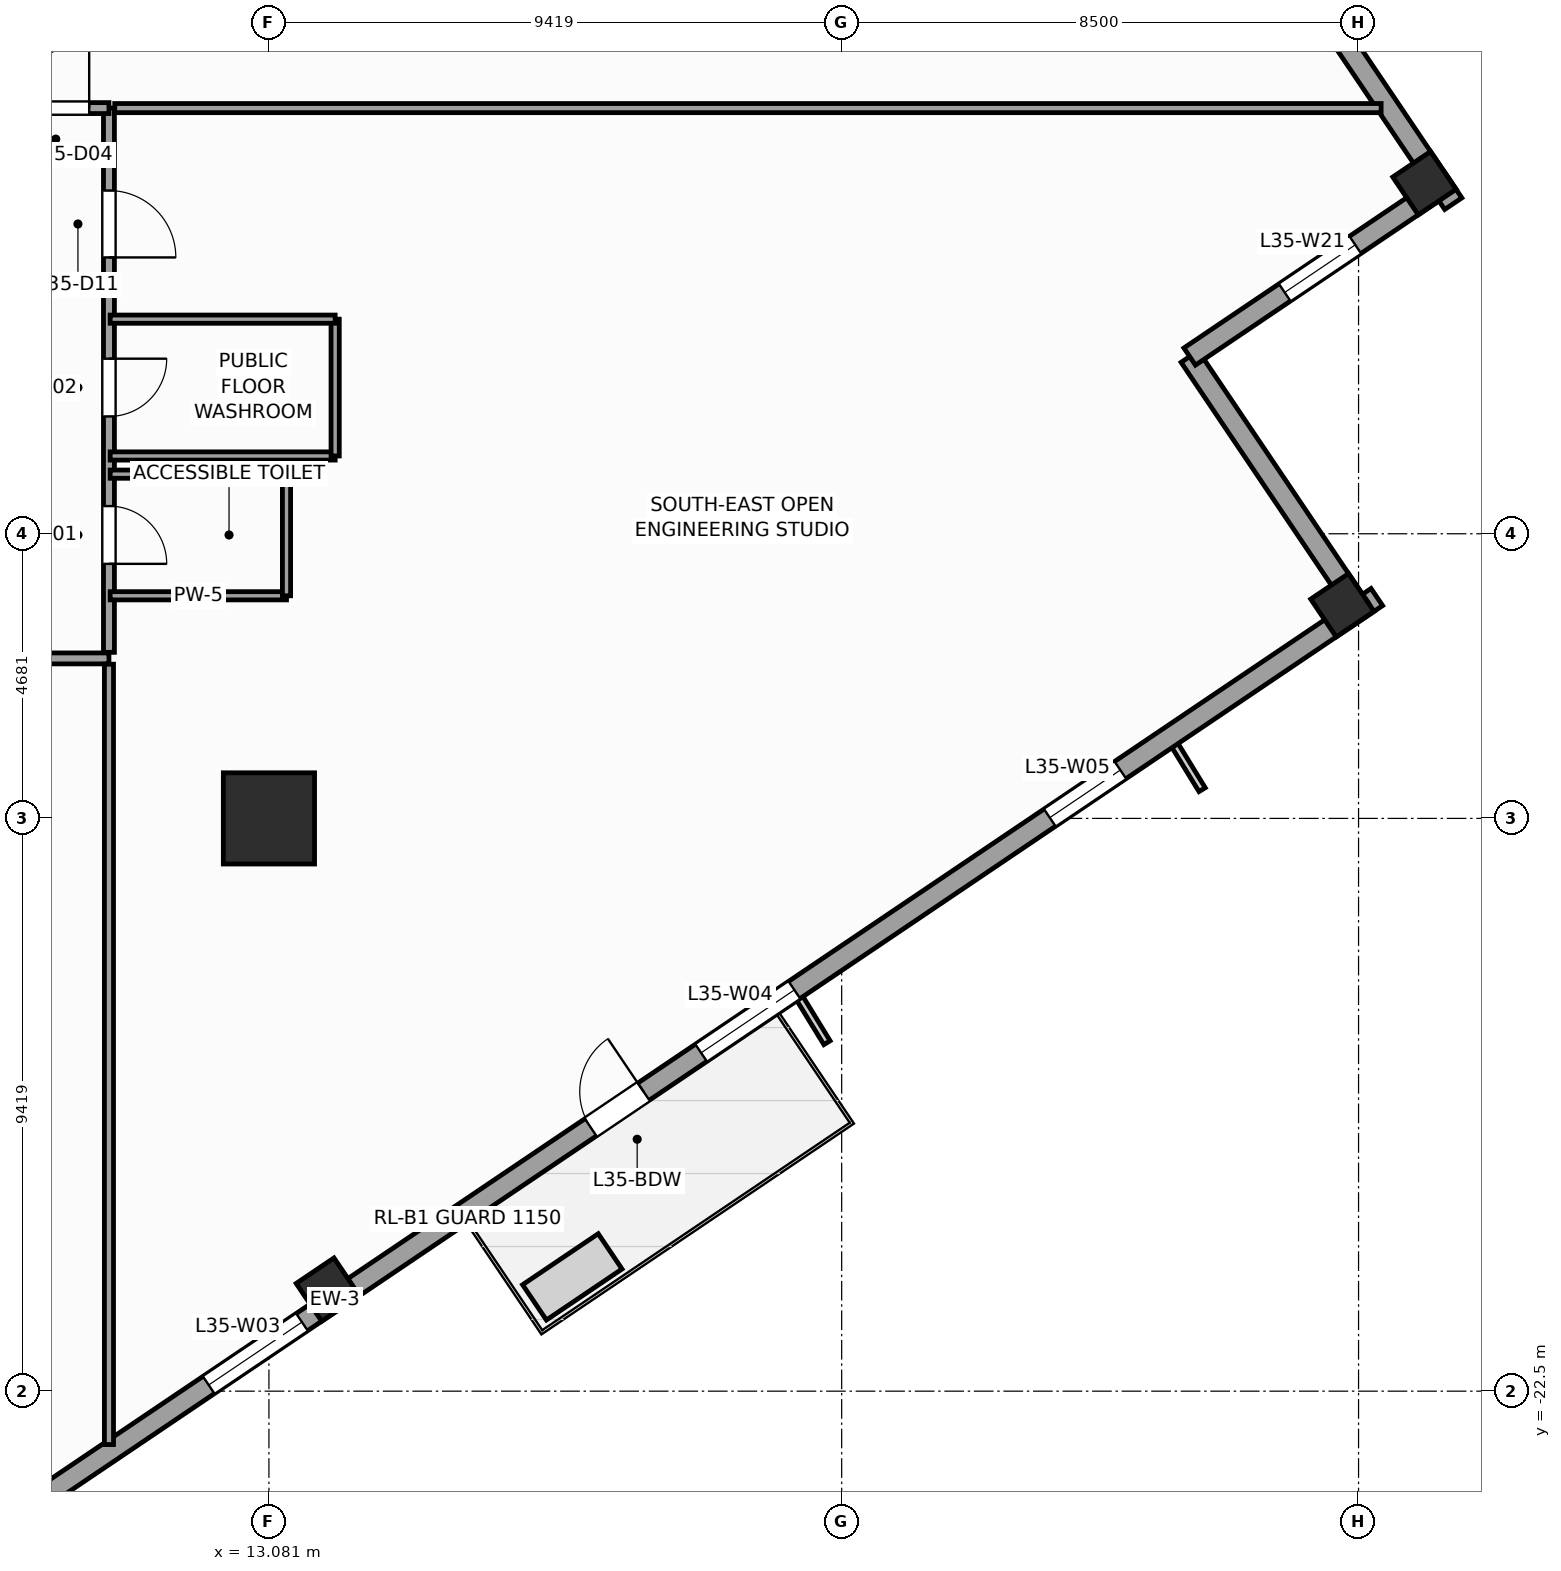
"""IFC4 building model, lengths in metres.
Left out: names, types, materials, properties, quantities, classifications, styles, units other than length and angle.
Written with IfcOpenShell. Run it as: python <this file> out.ifc"""

import sys

from ifc_helpers import new_model, si_unit, direction, frame, frame_2d, origin, origin_2d, place, context, subcontext, project, spatial, rectangle, extrude, source, transform, mapped, element, fill, save


model = new_model("IFC4")
c1 = context("Model", 3, precision=1e-05, world=origin(), true_north=direction((0.0, 1.0)))
c2 = subcontext(c1, "Body", "Model", "MODEL_VIEW")
j1 = project(units=[si_unit("LENGTHUNIT", "METRE"), si_unit("PLANEANGLEUNIT", "RADIAN")], contexts=[c1])
p1 = place(None, origin())
s1 = spatial("IfcSite", under=j1, at=p1, CompositionType="ELEMENT")
p2 = place(p1, origin())
s2 = spatial("IfcBuilding", under=s1, at=p2, CompositionType="ELEMENT")
p3 = place(p2, frame((0.0, 0.0, 148.4)))
s3 = spatial("IfcBuildingStorey", under=s2, at=p3, CompositionType="ELEMENT", Elevation=148.4)
m1 = source(origin(), c2, "Body", "SweptSolid", [
    extrude(rectangle(XDim=1.5, YDim=1.5, at=origin_2d()), origin(), (0.0, 0.0, 1.0), 4.0),
])
p4 = place(p3, frame((13.081, -13.081, 0.0), z_axis=(0.0, 0.0, 1.0), x_axis=(1.0, 0.0, 0.0)))
e1 = element("IfcColumn", 1, at=p4, inside=s3, PredefinedType="COLUMN", context=c2, shape_type="MappedRepresentation", body=[
    mapped(m1, transform((0.0, 0.0, 0.0), scale=1.0)),
])
m2 = source(origin(), c2, "Body", "SweptSolid", [
    extrude(rectangle(XDim=0.75, YDim=0.75, at=origin_2d()), origin(), (0.0, 0.0, 1.0), 4.0),
])
for number, where, z_axis, x_axis in (
    (2, (14.05, -20.83, 0.0), (0.0, 0.0, 1.0), (0.829, 0.559, 0.0)),
    (3, (30.734, -9.576, 0.0), (0.0, 0.0, 1.0), (0.829, 0.559, 0.0)),
    (4, (32.083, -2.635, 0.0), (0.0, 0.0, 1.0), (0.829, 0.559, 0.0)),
):
    element("IfcColumn", number, at=place(p3, frame(where, z_axis=z_axis, x_axis=x_axis)), inside=s3, PredefinedType="COLUMN", context=c2, shape_type="MappedRepresentation", body=[
        mapped(m2, transform((0.0, 0.0, 0.0), scale=1.0)),
    ])
p5 = place(p3, frame((-2.972, -32.558, 0.0), z_axis=(0.0, 0.0, 1.0), x_axis=(0.829036218961, 0.559194910251, 0.0)))
e5 = element("IfcWall", 5, at=p5, inside=s3, PredefinedType="STANDARD", context=c2, shape_type="SweptSolid", body=[
    extrude(rectangle(XDim=41.34, YDim=0.34, at=frame_2d((20.67, 0.0))), origin(), (0.0, 0.0, 1.0), 3.04),
])
p6 = place(p5, frame((25.745, 0.0, 0.0)))
e6 = element("IfcOpeningElement", 6, at=p6, cuts=e5, PredefinedType="OPENING", context=c2, shape_type="SweptSolid", body=[
    extrude(rectangle(XDim=1.05, YDim=2.25, at=frame_2d((0.525, 1.125))), frame((0.0, 0.18, 0.0), z_axis=(0.0, -1.0, 0.0), x_axis=(1.0, 0.0, 0.0)), (0.0, 0.0, 1.0), 0.36),
])
p7 = place(p5, frame((4.261, 0.0, 0.56)))
e7 = element("IfcOpeningElement", 7, at=p7, cuts=e5, PredefinedType="OPENING", context=c2, shape_type="SweptSolid", body=[
    extrude(rectangle(XDim=1.4, YDim=2.4, at=frame_2d((0.7, 1.2))), frame((0.0, 0.18, 0.0), z_axis=(0.0, -1.0, 0.0), x_axis=(1.0, 0.0, 0.0)), (0.0, 0.0, 1.0), 0.36),
])
p8 = place(p5, frame((11.064, 0.0, 0.61)))
e8 = element("IfcOpeningElement", 8, at=p8, cuts=e5, PredefinedType="OPENING", context=c2, shape_type="SweptSolid", body=[
    extrude(rectangle(XDim=1.85, YDim=2.35, at=frame_2d((0.925, 1.175))), frame((0.0, 0.18, 0.0), z_axis=(0.0, -1.0, 0.0), x_axis=(1.0, 0.0, 0.0)), (0.0, 0.0, 1.0), 0.36),
])
p9 = place(p5, frame((18.168, 0.0, 0.61)))
e9 = element("IfcOpeningElement", 9, at=p9, cuts=e5, PredefinedType="OPENING", context=c2, shape_type="SweptSolid", body=[
    extrude(rectangle(XDim=1.85, YDim=2.35, at=frame_2d((0.925, 1.175))), frame((0.0, 0.18, 0.0), z_axis=(0.0, -1.0, 0.0), x_axis=(1.0, 0.0, 0.0)), (0.0, 0.0, 1.0), 0.36),
])
p10 = place(p5, frame((27.936, 0.0, 0.61)))
e10 = element("IfcOpeningElement", 10, at=p10, cuts=e5, PredefinedType="OPENING", context=c2, shape_type="SweptSolid", body=[
    extrude(rectangle(XDim=1.85, YDim=2.35, at=frame_2d((0.925, 1.175))), frame((0.0, 0.18, 0.0), z_axis=(0.0, -1.0, 0.0), x_axis=(1.0, 0.0, 0.0)), (0.0, 0.0, 1.0), 0.36),
])
p11 = place(p5, frame((34.852, 0.0, 0.56)))
e11 = element("IfcOpeningElement", 11, at=p11, cuts=e5, PredefinedType="OPENING", context=c2, shape_type="SweptSolid", body=[
    extrude(rectangle(XDim=1.4, YDim=2.4, at=frame_2d((0.7, 1.2))), frame((0.0, 0.18, 0.0), z_axis=(0.0, -1.0, 0.0), x_axis=(1.0, 0.0, 0.0)), (0.0, 0.0, 1.0), 0.36),
])
p12 = place(p3, frame((31.019, -9.631, 0.0), z_axis=(0.0, 0.0, 1.0), x_axis=(-0.559210350234, 0.829025804298, 0.0)))
e12 = element("IfcWall", 12, at=p12, inside=s3, PredefinedType="STANDARD", context=c2, shape_type="SweptSolid", body=[
    extrude(rectangle(XDim=5.0, YDim=0.34, at=frame_2d((2.5, 0.0))), origin(), (0.0, 0.0, 1.0), 3.74),
])
p13 = place(p3, frame((28.223, -5.486, 0.0), z_axis=(0.0, 0.0, 1.0), x_axis=(0.82905227345, 0.559171107879, 0.0)))
e13 = element("IfcWall", 13, at=p13, inside=s3, PredefinedType="STANDARD", context=c2, shape_type="SweptSolid", body=[
    extrude(rectangle(XDim=5.17, YDim=0.34, at=frame_2d((2.585, 0.0))), origin(), (0.0, 0.0, 1.0), 3.04),
])
p14 = place(p13, frame((1.885, 0.0, 0.56)))
e14 = element("IfcOpeningElement", 14, at=p14, cuts=e13, PredefinedType="OPENING", context=c2, shape_type="SweptSolid", body=[
    extrude(rectangle(XDim=1.4, YDim=2.4, at=frame_2d((0.7, 1.2))), frame((0.0, 0.18, 0.0), z_axis=(0.0, -1.0, 0.0), x_axis=(1.0, 0.0, 0.0)), (0.0, 0.0, 1.0), 0.36),
])
p15 = place(p3, frame((32.558, -2.972, 0.0), z_axis=(0.0, 0.0, 1.0), x_axis=(-0.559194910251, 0.829036218961, 0.0)))
e15 = element("IfcWall", 15, at=p15, inside=s3, PredefinedType="STANDARD", context=c2, shape_type="SweptSolid", body=[
    extrude(rectangle(XDim=41.34, YDim=0.34, at=frame_2d((20.67, 0.0))), origin(), (0.0, 0.0, 1.0), 3.04),
])
p16 = place(p15, frame((4.261, 0.0, 0.56)))
e16 = element("IfcOpeningElement", 16, at=p16, cuts=e15, PredefinedType="OPENING", context=c2, shape_type="SweptSolid", body=[
    extrude(rectangle(XDim=1.4, YDim=2.4, at=frame_2d((0.7, 1.2))), frame((0.0, 0.18, 0.0), z_axis=(0.0, -1.0, 0.0), x_axis=(1.0, 0.0, 0.0)), (0.0, 0.0, 1.0), 0.36),
])
p17 = place(p15, frame((11.064, 0.0, 0.61)))
e17 = element("IfcOpeningElement", 17, at=p17, cuts=e15, PredefinedType="OPENING", context=c2, shape_type="SweptSolid", body=[
    extrude(rectangle(XDim=1.85, YDim=2.35, at=frame_2d((0.925, 1.175))), frame((0.0, 0.18, 0.0), z_axis=(0.0, -1.0, 0.0), x_axis=(1.0, 0.0, 0.0)), (0.0, 0.0, 1.0), 0.36),
])
p18 = place(p15, frame((18.168, 0.0, 0.61)))
e18 = element("IfcOpeningElement", 18, at=p18, cuts=e15, PredefinedType="OPENING", context=c2, shape_type="SweptSolid", body=[
    extrude(rectangle(XDim=1.85, YDim=2.35, at=frame_2d((0.925, 1.175))), frame((0.0, 0.18, 0.0), z_axis=(0.0, -1.0, 0.0), x_axis=(1.0, 0.0, 0.0)), (0.0, 0.0, 1.0), 0.36),
])
p19 = place(p15, frame((27.186, 0.0, 0.61)))
e19 = element("IfcOpeningElement", 19, at=p19, cuts=e15, PredefinedType="OPENING", context=c2, shape_type="SweptSolid", body=[
    extrude(rectangle(XDim=1.85, YDim=2.35, at=frame_2d((0.925, 1.175))), frame((0.0, 0.18, 0.0), z_axis=(0.0, -1.0, 0.0), x_axis=(1.0, 0.0, 0.0)), (0.0, 0.0, 1.0), 0.36),
])
p20 = place(p15, frame((34.852, 0.0, 0.56)))
e20 = element("IfcOpeningElement", 20, at=p20, cuts=e15, PredefinedType="OPENING", context=c2, shape_type="SweptSolid", body=[
    extrude(rectangle(XDim=1.4, YDim=2.4, at=frame_2d((0.7, 1.2))), frame((0.0, 0.18, 0.0), z_axis=(0.0, -1.0, 0.0), x_axis=(1.0, 0.0, 0.0)), (0.0, 0.0, 1.0), 0.36),
])
p21 = place(p3, frame((-10.45, -10.45, 0.0), z_axis=(0.0, 0.0, 1.0), x_axis=(1.0, 0.0, 0.0)))
e21 = element("IfcWall", 21, at=p21, inside=s3, PredefinedType="PARTITIONING", context=c2, shape_type="SweptSolid", body=[
    extrude(rectangle(XDim=20.9, YDim=0.18, at=frame_2d((10.45, 0.0))), origin(), (0.0, 0.0, 1.0), 3.74),
])
p22 = place(p21, frame((2.339, 0.0, 0.0)))
e22 = element("IfcOpeningElement", 22, at=p22, cuts=e21, PredefinedType="OPENING", context=c2, shape_type="SweptSolid", body=[
    extrude(rectangle(XDim=1.1, YDim=2.2, at=frame_2d((0.55, 1.1))), frame((0.0, 0.1, 0.0), z_axis=(0.0, -1.0, 0.0), x_axis=(1.0, 0.0, 0.0)), (0.0, 0.0, 1.0), 0.2),
])
p23 = place(p21, frame((7.4, 0.0, 0.0)))
e23 = element("IfcOpeningElement", 23, at=p23, cuts=e21, PredefinedType="OPENING", context=c2, shape_type="SweptSolid", body=[
    extrude(rectangle(XDim=1.1, YDim=2.2, at=frame_2d((0.55, 1.1))), frame((0.0, 0.1, 0.0), z_axis=(0.0, -1.0, 0.0), x_axis=(1.0, 0.0, 0.0)), (0.0, 0.0, 1.0), 0.2),
])
p24 = place(p21, frame((12.4, 0.0, 0.0)))
e24 = element("IfcOpeningElement", 24, at=p24, cuts=e21, PredefinedType="OPENING", context=c2, shape_type="SweptSolid", body=[
    extrude(rectangle(XDim=1.1, YDim=2.2, at=frame_2d((0.55, 1.1))), frame((0.0, 0.1, 0.0), z_axis=(0.0, -1.0, 0.0), x_axis=(1.0, 0.0, 0.0)), (0.0, 0.0, 1.0), 0.2),
])
p25 = place(p21, frame((17.46, 0.0, 0.0)))
e25 = element("IfcOpeningElement", 25, at=p25, cuts=e21, PredefinedType="OPENING", context=c2, shape_type="SweptSolid", body=[
    extrude(rectangle(XDim=1.1, YDim=2.2, at=frame_2d((0.55, 1.1))), frame((0.0, 0.1, 0.0), z_axis=(0.0, -1.0, 0.0), x_axis=(1.0, 0.0, 0.0)), (0.0, 0.0, 1.0), 0.2),
])
p26 = place(p3, frame((10.45, -10.35, 0.0), z_axis=(0.0, 0.0, 1.0), x_axis=(0.0, 1.0, 0.0)))
e26 = element("IfcWall", 26, at=p26, inside=s3, PredefinedType="PARTITIONING", context=c2, shape_type="SweptSolid", body=[
    extrude(rectangle(XDim=8.95, YDim=0.18, at=frame_2d((4.475, 0.0))), origin(), (0.0, 0.0, 1.0), 3.74),
])
p27 = place(p26, frame((1.455, 0.0, 0.0)))
e27 = element("IfcOpeningElement", 27, at=p27, cuts=e26, PredefinedType="OPENING", context=c2, shape_type="SweptSolid", body=[
    extrude(rectangle(XDim=0.95, YDim=2.1, at=frame_2d((0.475, 1.05))), frame((0.0, 0.1, 0.0), z_axis=(0.0, -1.0, 0.0), x_axis=(1.0, 0.0, 0.0)), (0.0, 0.0, 1.0), 0.2),
])
p28 = place(p26, frame((3.879, 0.0, 0.0)))
e28 = element("IfcOpeningElement", 28, at=p28, cuts=e26, PredefinedType="OPENING", context=c2, shape_type="SweptSolid", body=[
    extrude(rectangle(XDim=0.95, YDim=2.1, at=frame_2d((0.475, 1.05))), frame((0.0, 0.1, 0.0), z_axis=(0.0, -1.0, 0.0), x_axis=(1.0, 0.0, 0.0)), (0.0, 0.0, 1.0), 0.2),
])
p29 = place(p26, frame((6.494, 0.0, 0.0)))
e29 = element("IfcOpeningElement", 29, at=p29, cuts=e26, PredefinedType="OPENING", context=c2, shape_type="SweptSolid", body=[
    extrude(rectangle(XDim=1.1, YDim=2.2, at=frame_2d((0.55, 1.1))), frame((0.0, 0.1, 0.0), z_axis=(0.0, -1.0, 0.0), x_axis=(1.0, 0.0, 0.0)), (0.0, 0.0, 1.0), 0.2),
])
p30 = place(p3, frame((8.7, -1.4, 0.0), z_axis=(0.0, 0.0, 1.0), x_axis=(1.0, 0.0, 0.0)))
e30 = element("IfcWall", 30, at=p30, inside=s3, PredefinedType="PARTITIONING", context=c2, shape_type="SweptSolid", body=[
    extrude(rectangle(XDim=1.75, YDim=0.18, at=frame_2d((0.875, 0.0))), origin(), (0.0, 0.0, 1.0), 3.74),
])
p31 = place(p30, frame((0.325, 0.0, 0.0)))
e31 = element("IfcOpeningElement", 31, at=p31, cuts=e30, PredefinedType="OPENING", context=c2, shape_type="SweptSolid", body=[
    extrude(rectangle(XDim=1.1, YDim=2.2, at=frame_2d((0.55, 1.1))), frame((0.0, 0.1, 0.0), z_axis=(0.0, -1.0, 0.0), x_axis=(1.0, 0.0, 0.0)), (0.0, 0.0, 1.0), 0.2),
])
p32 = place(p3, frame((10.545, -1.4, 0.0), z_axis=(0.0, 0.0, 1.0), x_axis=(1.0, 0.0, 0.0)))
e32 = element("IfcWall", 32, at=p32, inside=s3, PredefinedType="PARTITIONING", context=c2, shape_type="SweptSolid", body=[
    extrude(rectangle(XDim=20.826, YDim=0.15, at=frame_2d((10.413, 0.0))), origin(), (0.0, 0.0, 1.0), 3.74),
])
p33 = place(p3, frame((10.45, -23.378, 0.0), z_axis=(0.0, 0.0, 1.0), x_axis=(0.0, 1.0, 0.0)))
e33 = element("IfcWall", 33, at=p33, inside=s3, PredefinedType="PARTITIONING", context=c2, shape_type="SweptSolid", body=[
    extrude(rectangle(XDim=12.833, YDim=0.15, at=frame_2d((6.417, 0.0))), origin(), (0.0, 0.0, 1.0), 3.74),
])
p34 = place(p3, frame((10.47, -9.42, 0.0), z_axis=(0.0, 0.0, 1.0), x_axis=(1.0, 0.0, 0.0)))
e34 = element("IfcWall", 34, at=p34, inside=s3, PredefinedType="PARTITIONING", context=c2, shape_type="SweptSolid", body=[
    extrude(rectangle(XDim=2.9, YDim=0.135, at=frame_2d((1.45, 0.0))), origin(), (0.0, 0.0, 1.0), 3.74),
])
p35 = place(p3, frame((13.37, -9.42, 0.0), z_axis=(0.0, 0.0, 1.0), x_axis=(0.0, 1.0, 0.0)))
e35 = element("IfcWall", 35, at=p35, inside=s3, PredefinedType="PARTITIONING", context=c2, shape_type="SweptSolid", body=[
    extrude(rectangle(XDim=2.0, YDim=0.135, at=frame_2d((1.0, 0.0))), origin(), (0.0, 0.0, 1.0), 2.84),
])
p36 = place(p3, frame((10.47, -7.42, 0.0), z_axis=(0.0, 0.0, 1.0), x_axis=(1.0, 0.0, 0.0)))
e36 = element("IfcWall", 36, at=p36, inside=s3, PredefinedType="PARTITIONING", context=c2, shape_type="SweptSolid", body=[
    extrude(rectangle(XDim=2.9, YDim=0.135, at=frame_2d((1.45, 0.0))), origin(), (0.0, 0.0, 1.0), 3.74),
])
p37 = place(p3, frame((10.47, -7.121, 0.0), z_axis=(0.0, 0.0, 1.0), x_axis=(1.0, 0.0, 0.0)))
e37 = element("IfcWall", 37, at=p37, inside=s3, PredefinedType="PARTITIONING", context=c2, shape_type="SweptSolid", body=[
    extrude(rectangle(XDim=3.7, YDim=0.135, at=frame_2d((1.85, 0.0))), origin(), (0.0, 0.0, 1.0), 3.74),
])
p38 = place(p3, frame((14.17, -7.121, 0.0), z_axis=(0.0, 0.0, 1.0), x_axis=(0.0, 1.0, 0.0)))
e38 = element("IfcWall", 38, at=p38, inside=s3, PredefinedType="PARTITIONING", context=c2, shape_type="SweptSolid", body=[
    extrude(rectangle(XDim=2.25, YDim=0.135, at=frame_2d((1.125, 0.0))), origin(), (0.0, 0.0, 1.0), 3.74),
])
p39 = place(p3, frame((10.47, -4.871, 0.0), z_axis=(0.0, 0.0, 1.0), x_axis=(1.0, 0.0, 0.0)))
e39 = element("IfcWall", 39, at=p39, inside=s3, PredefinedType="PARTITIONING", context=c2, shape_type="SweptSolid", body=[
    extrude(rectangle(XDim=3.7, YDim=0.135, at=frame_2d((1.85, 0.0))), origin(), (0.0, 0.0, 1.0), 3.74),
])
m3 = source(origin(), c2, "Body", "SweptSolid", [
    extrude(rectangle(XDim=1.05, YDim=2.25, at=frame_2d((0.525, 1.125))), frame((0.0, 0.025, 0.0), z_axis=(0.0, -1.0, 0.0), x_axis=(1.0, 0.0, 0.0)), (0.0, 0.0, 1.0), 0.05),
])
p40 = place(p6, origin())
e40 = element("IfcDoor", 40, at=p40, inside=s3, OperationType="SINGLE_SWING_RIGHT", PredefinedType="DOOR", context=c2, shape_type="MappedRepresentation", body=[
    mapped(m3, transform((0.0, 0.0, 0.0), scale=1.0)),
])
fill(e6, e40)
m4 = source(origin(), c2, "Body", "SweptSolid", [
    extrude(rectangle(XDim=1.85, YDim=2.35, at=frame_2d((0.925, 1.175))), frame((0.0, 0.03, 0.0), z_axis=(0.0, -1.0, 0.0), x_axis=(1.0, 0.0, 0.0)), (0.0, 0.0, 1.0), 0.06),
])
p41 = place(p9, origin())
e41 = element("IfcWindow", 41, at=p41, inside=s3, PartitioningType="SINGLE_PANEL", PredefinedType="WINDOW", context=c2, shape_type="MappedRepresentation", body=[
    mapped(m4, transform((0.0, 0.0, 0.0), scale=1.0)),
])
fill(e9, e41)
p42 = place(p10, origin())
e42 = element("IfcWindow", 42, at=p42, inside=s3, PartitioningType="SINGLE_PANEL", PredefinedType="WINDOW", context=c2, shape_type="MappedRepresentation", body=[
    mapped(m4, transform((0.0, 0.0, 0.0), scale=1.0)),
])
fill(e10, e42)
m5 = source(origin(), c2, "Body", "SweptSolid", [
    extrude(rectangle(XDim=1.4, YDim=2.4, at=frame_2d((0.7, 1.2))), frame((0.0, 0.03, 0.0), z_axis=(0.0, -1.0, 0.0), x_axis=(1.0, 0.0, 0.0)), (0.0, 0.0, 1.0), 0.06),
])
p43 = place(p11, origin())
e43 = element("IfcWindow", 43, at=p43, inside=s3, PartitioningType="SINGLE_PANEL", PredefinedType="WINDOW", context=c2, shape_type="MappedRepresentation", body=[
    mapped(m5, transform((0.0, 0.0, 0.0), scale=1.0)),
])
fill(e11, e43)
p44 = place(p14, origin())
e44 = element("IfcWindow", 44, at=p44, inside=s3, PartitioningType="SINGLE_PANEL", PredefinedType="WINDOW", context=c2, shape_type="MappedRepresentation", body=[
    mapped(m5, transform((0.0, 0.0, 0.0), scale=1.0)),
])
fill(e14, e44)
m6 = source(origin(), c2, "Body", "SweptSolid", [
    extrude(rectangle(XDim=0.95, YDim=2.1, at=frame_2d((0.475, 1.05))), frame((0.0, 0.025, 0.0), z_axis=(0.0, -1.0, 0.0), x_axis=(1.0, 0.0, 0.0)), (0.0, 0.0, 1.0), 0.05),
])
p45 = place(p27, frame((0.95, 0.0, 0.0), z_axis=(0.0, 0.0, 1.0), x_axis=(-1.0, 0.0, 0.0)))
e45 = element("IfcDoor", 45, at=p45, inside=s3, OperationType="SINGLE_SWING_LEFT", PredefinedType="DOOR", context=c2, shape_type="MappedRepresentation", body=[
    mapped(m6, transform((0.0, 0.0, 0.0), scale=1.0)),
])
fill(e27, e45)
p46 = place(p28, frame((0.95, 0.0, 0.0), z_axis=(0.0, 0.0, 1.0), x_axis=(-1.0, 0.0, 0.0)))
e46 = element("IfcDoor", 46, at=p46, inside=s3, OperationType="SINGLE_SWING_RIGHT", PredefinedType="DOOR", context=c2, shape_type="MappedRepresentation", body=[
    mapped(m6, transform((0.0, 0.0, 0.0), scale=1.0)),
])
fill(e28, e46)
m7 = source(origin(), c2, "Body", "SweptSolid", [
    extrude(rectangle(XDim=1.1, YDim=2.2, at=frame_2d((0.55, 1.1))), frame((0.0, 0.025, 0.0), z_axis=(0.0, -1.0, 0.0), x_axis=(1.0, 0.0, 0.0)), (0.0, 0.0, 1.0), 0.05),
])
p47 = place(p31, origin())
e47 = element("IfcDoor", 47, at=p47, inside=s3, OperationType="SINGLE_SWING_RIGHT", PredefinedType="DOOR", context=c2, shape_type="MappedRepresentation", body=[
    mapped(m7, transform((0.0, 0.0, 0.0), scale=1.0)),
])
fill(e31, e47)
p48 = place(p29, frame((1.1, 0.0, 0.0), z_axis=(0.0, 0.0, 1.0), x_axis=(-1.0, 0.0, 0.0)))
e48 = element("IfcDoor", 48, at=p48, inside=s3, OperationType="SINGLE_SWING_LEFT", PredefinedType="DOOR", context=c2, shape_type="MappedRepresentation", body=[
    mapped(m7, transform((0.0, 0.0, 0.0), scale=1.0)),
])
fill(e29, e48)
save(model, sys.argv[1])
